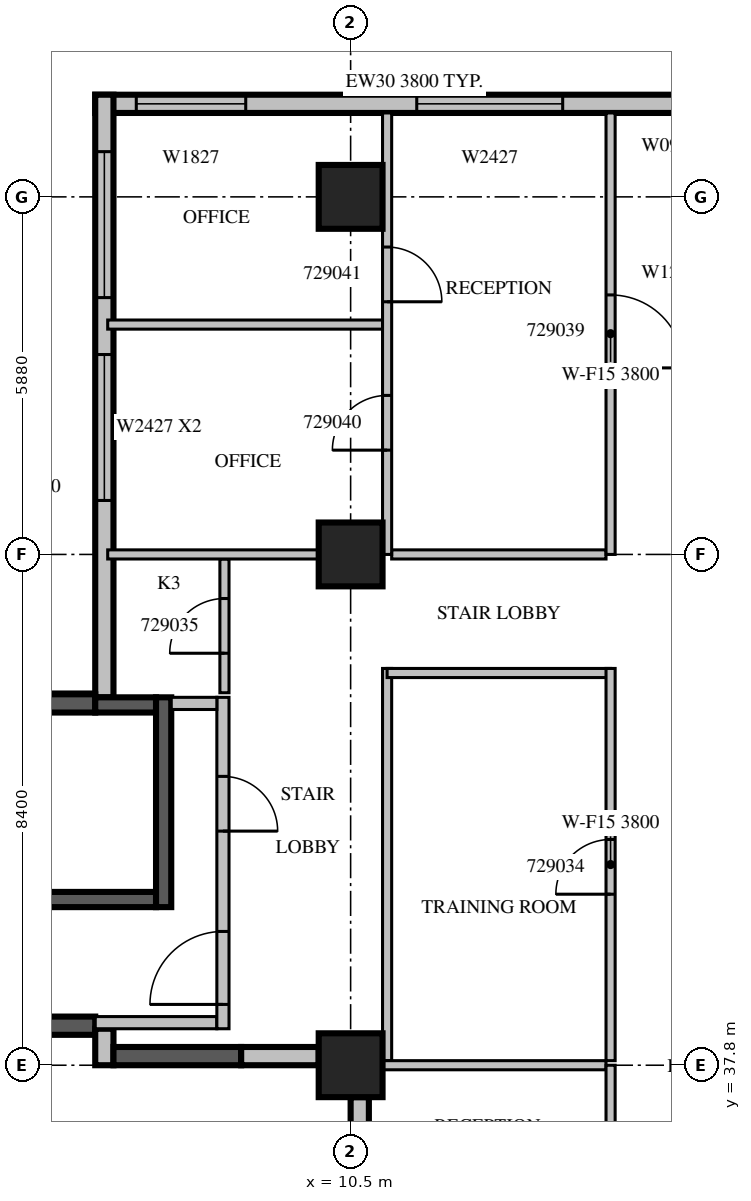
"""IFC4 building model, lengths in metres.
Left out: names, types, materials, properties, quantities, classifications, styles, units other than length and angle.
Written with IfcOpenShell. Run it as: python <this file> out.ifc"""

import sys

from ifc_helpers import new_model, si_unit, direction, frame, frame_2d, origin, origin_2d, place, context, subcontext, project, spatial, rectangle, extrude, source, transform, mapped, element, fill, save


model = new_model("IFC4")
c1 = context("Model", 3, precision=1e-05, world=origin(), true_north=direction((0.0, 1.0)))
c2 = subcontext(c1, "Body", "Model", "MODEL_VIEW")
j1 = project(units=[si_unit("LENGTHUNIT", "METRE"), si_unit("PLANEANGLEUNIT", "RADIAN")], contexts=[c1])
p1 = place(None, origin())
s1 = spatial("IfcSite", under=j1, at=p1, CompositionType="ELEMENT")
p2 = place(p1, origin())
s2 = spatial("IfcBuilding", under=s1, at=p2, CompositionType="ELEMENT")
p3 = place(p2, frame((0.0, 0.0, 132.9)))
s3 = spatial("IfcBuildingStorey", under=s2, at=p3, CompositionType="ELEMENT", Elevation=132.9)
m1 = source(origin(), c2, "Body", "SweptSolid", [
    extrude(rectangle(XDim=1.05, YDim=1.05, at=origin_2d()), origin(), (0.0, 0.0, 1.0), 4.2),
])
for number, where, z_axis, x_axis in (
    (1, (10.5, 37.8, 0.0), (0.0, 0.0, 1.0), (1.0, 0.0, 0.0)),
    (2, (10.5, 46.2, 0.0), (0.0, 0.0, 1.0), (1.0, 0.0, 0.0)),
    (3, (10.5, 52.08, 0.0), (0.0, 0.0, 1.0), (1.0, 0.0, 0.0)),
):
    element("IfcColumn", number, at=place(p3, frame(where, z_axis=z_axis, x_axis=x_axis)), inside=s3, PredefinedType="COLUMN", context=c2, shape_type="MappedRepresentation", body=[
        mapped(m1, transform((0.0, 0.0, 0.0), scale=1.0)),
    ])
m2 = source(origin(), c2, "Body", "SweptSolid", [
    extrude(rectangle(XDim=10.5, YDim=0.3, at=frame_2d((5.25, 0.0))), origin(), (0.0, 0.0, 1.0), 3.8),
])
p4 = place(p3, frame((16.8, 53.61, 0.0), z_axis=(0.0, 0.0, 1.0), x_axis=(-1.0, 0.0, 0.0)))
e4 = element("IfcWall", 4, at=p4, inside=s3, PredefinedType="STANDARD", context=c2, shape_type="MappedRepresentation", body=[
    mapped(m2, transform((0.0, 0.0, 0.0), scale=1.0)),
])
m3 = source(origin(), c2, "Body", "SweptSolid", [
    extrude(rectangle(XDim=1.8, YDim=2.7, at=frame_2d((0.9, 1.35))), frame((0.0, 0.16, 0.0), z_axis=(0.0, -1.0, 0.0), x_axis=(1.0, 0.0, 0.0)), (0.0, 0.0, 1.0), 0.32),
])
p5 = place(p4, frame((8.025, 0.0, 0.6)))
e5 = element("IfcOpeningElement", 5, at=p5, cuts=e4, PredefinedType="OPENING", context=c2, shape_type="MappedRepresentation", body=[
    mapped(m3, transform((0.0, 0.0, 0.0), scale=1.0)),
])
m4 = source(origin(), c2, "Body", "SweptSolid", [
    extrude(rectangle(XDim=2.4, YDim=2.7, at=frame_2d((1.2, 1.35))), frame((0.0, 0.16, 0.0), z_axis=(0.0, -1.0, 0.0), x_axis=(1.0, 0.0, 0.0)), (0.0, 0.0, 1.0), 0.32),
])
p6 = place(p4, frame((2.812, 0.0, 0.6)))
e6 = element("IfcOpeningElement", 6, at=p6, cuts=e4, PredefinedType="OPENING", context=c2, shape_type="MappedRepresentation", body=[
    mapped(m4, transform((0.0, 0.0, 0.0), scale=1.0)),
])
m5 = source(origin(), c2, "Body", "SweptSolid", [
    extrude(rectangle(XDim=9.91, YDim=0.3, at=frame_2d((4.955, 0.0))), origin(), (0.0, 0.0, 1.0), 3.8),
])
p7 = place(p3, frame((6.45, 53.76, 0.0), z_axis=(0.0, 0.0, 1.0), x_axis=(0.0, -1.0, 0.0)))
e7 = element("IfcWall", 7, at=p7, inside=s3, PredefinedType="STANDARD", context=c2, shape_type="MappedRepresentation", body=[
    mapped(m5, transform((0.0, 0.0, 0.0), scale=1.0)),
])
p8 = place(p7, frame((4.272, 0.0, 0.6)))
e8 = element("IfcOpeningElement", 8, at=p8, cuts=e7, PredefinedType="OPENING", context=c2, shape_type="MappedRepresentation", body=[
    mapped(m4, transform((0.0, 0.0, 0.0), scale=1.0)),
])
p9 = place(p7, frame((0.936, 0.0, 0.6)))
e9 = element("IfcOpeningElement", 9, at=p9, cuts=e7, PredefinedType="OPENING", context=c2, shape_type="MappedRepresentation", body=[
    mapped(m4, transform((0.0, 0.0, 0.0), scale=1.0)),
])
m6 = source(origin(), c2, "Body", "SweptSolid", [
    extrude(rectangle(XDim=6.1, YDim=0.3, at=frame_2d((3.05, 0.0))), origin(), (0.0, 0.0, 1.0), 3.8),
])
for number, where, z_axis, x_axis in (
    (10, (6.3, 43.75, 0.0), (0.0, 0.0, 1.0), (-1.0, 0.0, 0.0)),
    (11, (0.2, 38.45, 0.0), (0.0, 0.0, 1.0), (1.0, 0.0, 0.0)),
):
    element("IfcWall", number, at=place(p3, frame(where, z_axis=z_axis, x_axis=x_axis)), inside=s3, PredefinedType="SOLIDWALL", context=c2, shape_type="MappedRepresentation", body=[
        mapped(m6, transform((0.0, 0.0, 0.0), scale=1.0)),
    ])
m7 = source(origin(), c2, "Body", "SweptSolid", [
    extrude(rectangle(XDim=0.6, YDim=0.3, at=frame_2d((0.3, 0.0))), origin(), (0.0, 0.0, 1.0), 3.8),
])
p10 = place(p3, frame((6.45, 38.4, 0.0), z_axis=(0.0, 0.0, 1.0), x_axis=(0.0, -1.0, 0.0)))
e12 = element("IfcWall", 12, at=p10, inside=s3, PredefinedType="STANDARD", context=c2, shape_type="MappedRepresentation", body=[
    mapped(m7, transform((0.0, 0.0, 0.0), scale=1.0)),
])
m8 = source(origin(), c2, "Body", "SweptSolid", [
    extrude(rectangle(XDim=2.1, YDim=0.3, at=frame_2d((1.05, 0.0))), origin(), (0.0, 0.0, 1.0), 3.8),
])
p11 = place(p3, frame((6.6, 37.95, 0.0), z_axis=(0.0, 0.0, 1.0), x_axis=(1.0, 0.0, 0.0)))
e13 = element("IfcWall", 13, at=p11, inside=s3, PredefinedType="SOLIDWALL", context=c2, shape_type="MappedRepresentation", body=[
    mapped(m8, transform((0.0, 0.0, 0.0), scale=1.0)),
])
m9 = source(origin(), c2, "Body", "SweptSolid", [
    extrude(rectangle(XDim=1.275, YDim=0.3, at=frame_2d((0.637, 0.0))), origin(), (0.0, 0.0, 1.0), 3.8),
])
p12 = place(p3, frame((8.7, 37.95, 0.0), z_axis=(0.0, 0.0, 1.0), x_axis=(1.0, 0.0, 0.0)))
e14 = element("IfcWall", 14, at=p12, inside=s3, PredefinedType="STANDARD", context=c2, shape_type="MappedRepresentation", body=[
    mapped(m9, transform((0.0, 0.0, 0.0), scale=1.0)),
])
m10 = source(origin(), c2, "Body", "SweptSolid", [
    extrude(rectangle(XDim=7.35, YDim=0.3, at=frame_2d((3.675, 0.0))), origin(), (0.0, 0.0, 1.0), 2.8),
])
p13 = place(p3, frame((10.65, 37.275, 0.0), z_axis=(0.0, 0.0, 1.0), x_axis=(0.0, -1.0, 0.0)))
e15 = element("IfcWall", 15, at=p13, inside=s3, PredefinedType="STANDARD", context=c2, shape_type="MappedRepresentation", body=[
    mapped(m10, transform((0.0, 0.0, 0.0), scale=1.0)),
])
m11 = source(origin(), c2, "Body", "SweptSolid", [
    extrude(rectangle(XDim=7.0, YDim=0.25, at=frame_2d((3.5, 0.0))), origin(), (0.0, 0.0, 1.0), 3.8),
])
p14 = place(p3, frame((0.3, 40.525, 0.0), z_axis=(0.0, 0.0, 1.0), x_axis=(1.0, 0.0, 0.0)))
e16 = element("IfcWall", 16, at=p14, inside=s3, PredefinedType="SOLIDWALL", context=c2, shape_type="MappedRepresentation", body=[
    mapped(m11, transform((0.0, 0.0, 0.0), scale=1.0)),
])
m12 = source(origin(), c2, "Body", "SweptSolid", [
    extrude(rectangle(XDim=1.1, YDim=2.1, at=frame_2d((0.55, 1.05))), frame((0.0, 0.135, 0.0), z_axis=(0.0, -1.0, 0.0), x_axis=(1.0, 0.0, 0.0)), (0.0, 0.0, 1.0), 0.27),
])
p15 = place(p14, frame((0.55, 0.0, 0.0)))
e17 = element("IfcOpeningElement", 17, at=p15, cuts=e16, PredefinedType="OPENING", context=c2, shape_type="MappedRepresentation", body=[
    mapped(m12, transform((0.0, 0.0, 0.0), scale=1.0)),
])
m13 = source(origin(), c2, "Body", "SweptSolid", [
    extrude(rectangle(XDim=1.0, YDim=0.25, at=frame_2d((0.5, 0.0))), origin(), (0.0, 0.0, 1.0), 3.8),
])
p16 = place(p3, frame((6.3, 43.725, 0.0), z_axis=(0.0, 0.0, 1.0), x_axis=(1.0, 0.0, 0.0)))
e18 = element("IfcWall", 18, at=p16, inside=s3, PredefinedType="SOLIDWALL", context=c2, shape_type="MappedRepresentation", body=[
    mapped(m13, transform((0.0, 0.0, 0.0), scale=1.0)),
])
m14 = source(origin(), c2, "Body", "SweptSolid", [
    extrude(rectangle(XDim=3.45, YDim=0.25, at=frame_2d((1.725, 0.0))), origin(), (0.0, 0.0, 1.0), 3.8),
])
p17 = place(p3, frame((7.425, 40.4, 0.0), z_axis=(0.0, 0.0, 1.0), x_axis=(0.0, 1.0, 0.0)))
e19 = element("IfcWall", 19, at=p17, inside=s3, PredefinedType="SOLIDWALL", context=c2, shape_type="MappedRepresentation", body=[
    mapped(m14, transform((0.0, 0.0, 0.0), scale=1.0)),
])
m15 = source(origin(), c2, "Body", "SweptSolid", [
    extrude(rectangle(XDim=2.0, YDim=0.2, at=frame_2d((1.0, 0.0))), origin(), (0.0, 0.0, 1.0), 3.8),
])
p18 = place(p3, frame((6.3, 38.5, 0.0), z_axis=(0.0, 0.0, 1.0), x_axis=(1.0, 0.0, 0.0)))
e20 = element("IfcWall", 20, at=p18, inside=s3, PredefinedType="PARTITIONING", context=c2, shape_type="MappedRepresentation", body=[
    mapped(m15, transform((0.0, 0.0, 0.0), scale=1.0)),
])
m16 = source(origin(), c2, "Body", "SweptSolid", [
    extrude(rectangle(XDim=5.45, YDim=0.2, at=frame_2d((2.725, 0.0))), origin(), (0.0, 0.0, 1.0), 3.8),
])
p19 = place(p3, frame((8.4, 38.4, 0.0), z_axis=(0.0, 0.0, 1.0), x_axis=(0.0, 1.0, 0.0)))
e21 = element("IfcWall", 21, at=p19, inside=s3, PredefinedType="PARTITIONING", context=c2, shape_type="MappedRepresentation", body=[
    mapped(m16, transform((0.0, 0.0, 0.0), scale=1.0)),
])
m17 = source(origin(), c2, "Body", "SweptSolid", [
    extrude(rectangle(XDim=1.2, YDim=2.1, at=frame_2d((0.6, 1.05))), frame((0.0, 0.11, 0.0), z_axis=(0.0, -1.0, 0.0), x_axis=(1.0, 0.0, 0.0)), (0.0, 0.0, 1.0), 0.22),
])
p20 = place(p19, frame((0.4, 0.0, 0.0)))
e22 = element("IfcOpeningElement", 22, at=p20, cuts=e21, PredefinedType="OPENING", context=c2, shape_type="MappedRepresentation", body=[
    mapped(m17, transform((0.0, 0.0, 0.0), scale=1.0)),
])
m18 = source(origin(), c2, "Body", "SweptSolid", [
    extrude(rectangle(XDim=0.9, YDim=2.1, at=frame_2d((0.45, 1.05))), frame((0.0, 0.11, 0.0), z_axis=(0.0, -1.0, 0.0), x_axis=(1.0, 0.0, 0.0)), (0.0, 0.0, 1.0), 0.22),
])
p21 = place(p19, frame((3.25, 0.0, 0.0)))
e23 = element("IfcOpeningElement", 23, at=p21, cuts=e21, PredefinedType="OPENING", context=c2, shape_type="MappedRepresentation", body=[
    mapped(m18, transform((0.0, 0.0, 0.0), scale=1.0)),
])
m19 = source(origin(), c2, "Body", "SweptSolid", [
    extrude(rectangle(XDim=0.75, YDim=0.2, at=frame_2d((0.375, 0.0))), origin(), (0.0, 0.0, 1.0), 3.8),
])
p22 = place(p3, frame((7.55, 43.75, 0.0), z_axis=(0.0, 0.0, 1.0), x_axis=(1.0, 0.0, 0.0)))
e24 = element("IfcWall", 24, at=p22, inside=s3, PredefinedType="PARTITIONING", context=c2, shape_type="MappedRepresentation", body=[
    mapped(m19, transform((0.0, 0.0, 0.0), scale=1.0)),
])
m20 = source(origin(), c2, "Body", "SweptSolid", [
    extrude(rectangle(XDim=6.45, YDim=0.15, at=frame_2d((3.225, 0.0))), origin(), (0.0, 0.0, 1.0), 3.8),
])
p23 = place(p3, frame((11.1, 44.325, 0.0), z_axis=(0.0, 0.0, 1.0), x_axis=(0.0, -1.0, 0.0)))
e25 = element("IfcWall", 25, at=p23, inside=s3, PredefinedType="PARTITIONING", context=c2, shape_type="MappedRepresentation", body=[
    mapped(m20, transform((0.0, 0.0, 0.0), scale=1.0)),
])
m21 = source(origin(), c2, "Body", "SweptSolid", [
    extrude(rectangle(XDim=3.675, YDim=0.15, at=frame_2d((1.837, 0.0))), origin(), (0.0, 0.0, 1.0), 3.8),
])
p24 = place(p3, frame((14.775, 44.25, 0.0), z_axis=(0.0, 0.0, 1.0), x_axis=(-1.0, 0.0, 0.0)))
e26 = element("IfcWall", 26, at=p24, inside=s3, PredefinedType="PARTITIONING", context=c2, shape_type="MappedRepresentation", body=[
    mapped(m21, transform((0.0, 0.0, 0.0), scale=1.0)),
])
p25 = place(p3, frame((14.775, 37.875, 0.0), z_axis=(0.0, 0.0, 1.0), x_axis=(0.0, 1.0, 0.0)))
e27 = element("IfcWall", 27, at=p25, inside=s3, PredefinedType="PARTITIONING", context=c2, shape_type="MappedRepresentation", body=[
    mapped(m20, transform((0.0, 0.0, 0.0), scale=1.0)),
])
m22 = source(origin(), c2, "Body", "SweptSolid", [
    extrude(rectangle(XDim=0.9, YDim=2.1, at=frame_2d((0.45, 1.05))), frame((0.0, 0.085, 0.0), z_axis=(0.0, -1.0, 0.0), x_axis=(1.0, 0.0, 0.0)), (0.0, 0.0, 1.0), 0.17),
])
p26 = place(p25, frame((2.737, 0.0, 0.0)))
e28 = element("IfcOpeningElement", 28, at=p26, cuts=e27, PredefinedType="OPENING", context=c2, shape_type="MappedRepresentation", body=[
    mapped(m22, transform((0.0, 0.0, 0.0), scale=1.0)),
])
m23 = source(origin(), c2, "Body", "SweptSolid", [
    extrude(rectangle(XDim=2.2, YDim=0.15, at=frame_2d((1.1, 0.0))), origin(), (0.0, 0.0, 1.0), 3.8),
])
p27 = place(p3, frame((8.425, 43.925, 0.0), z_axis=(0.0, 0.0, 1.0), x_axis=(0.0, 1.0, 0.0)))
e29 = element("IfcWall", 29, at=p27, inside=s3, PredefinedType="PARTITIONING", context=c2, shape_type="MappedRepresentation", body=[
    mapped(m23, transform((0.0, 0.0, 0.0), scale=1.0)),
])
p28 = place(p27, frame((0.65, 0.0, 0.0)))
e30 = element("IfcOpeningElement", 30, at=p28, cuts=e29, PredefinedType="OPENING", context=c2, shape_type="MappedRepresentation", body=[
    mapped(m22, transform((0.0, 0.0, 0.0), scale=1.0)),
])
m24 = source(origin(), c2, "Body", "SweptSolid", [
    extrude(rectangle(XDim=3.676, YDim=0.15, at=frame_2d((1.838, 0.0))), origin(), (0.0, 0.0, 1.0), 3.8),
])
p29 = place(p3, frame((14.7, 37.8, 0.0), z_axis=(0.0, 0.0, 1.0), x_axis=(-1.0, 0.0, 0.0)))
e31 = element("IfcWall", 31, at=p29, inside=s3, PredefinedType="PARTITIONING", context=c2, shape_type="MappedRepresentation", body=[
    mapped(m24, transform((0.0, 0.0, 0.0), scale=1.0)),
])
m25 = source(origin(), c2, "Body", "SweptSolid", [
    extrude(rectangle(XDim=4.52, YDim=0.15, at=frame_2d((2.26, 0.0))), origin(), (0.0, 0.0, 1.0), 3.8),
])
p30 = place(p3, frame((11.025, 49.98, 0.0), z_axis=(0.0, 0.0, 1.0), x_axis=(-1.0, 0.0, 0.0)))
e32 = element("IfcWall", 32, at=p30, inside=s3, PredefinedType="PARTITIONING", context=c2, shape_type="MappedRepresentation", body=[
    mapped(m25, transform((0.0, 0.0, 0.0), scale=1.0)),
])
m26 = source(origin(), c2, "Body", "SweptSolid", [
    extrude(rectangle(XDim=3.471, YDim=0.15, at=frame_2d((1.736, 0.0))), origin(), (0.0, 0.0, 1.0), 3.8),
])
p31 = place(p3, frame((9.976, 46.2, 0.0), z_axis=(0.0, 0.0, 1.0), x_axis=(-1.0, 0.0, 0.0)))
e33 = element("IfcWall", 33, at=p31, inside=s3, PredefinedType="PARTITIONING", context=c2, shape_type="MappedRepresentation", body=[
    mapped(m26, transform((0.0, 0.0, 0.0), scale=1.0)),
])
m27 = source(origin(), c2, "Body", "SweptSolid", [
    extrude(rectangle(XDim=3.525, YDim=0.15, at=frame_2d((1.762, 0.0))), origin(), (0.0, 0.0, 1.0), 3.8),
])
p32 = place(p3, frame((14.7, 46.2, 0.0), z_axis=(0.0, 0.0, 1.0), x_axis=(-1.0, 0.0, 0.0)))
e34 = element("IfcWall", 34, at=p32, inside=s3, PredefinedType="PARTITIONING", context=c2, shape_type="MappedRepresentation", body=[
    mapped(m27, transform((0.0, 0.0, 0.0), scale=1.0)),
])
m28 = source(origin(), c2, "Body", "SweptSolid", [
    extrude(rectangle(XDim=7.26, YDim=0.15, at=frame_2d((3.63, 0.0))), origin(), (0.0, 0.0, 1.0), 3.8),
])
p33 = place(p3, frame((11.1, 46.2, 0.0), z_axis=(0.0, 0.0, 1.0), x_axis=(0.0, 1.0, 0.0)))
e35 = element("IfcWall", 35, at=p33, inside=s3, PredefinedType="PARTITIONING", context=c2, shape_type="MappedRepresentation", body=[
    mapped(m28, transform((0.0, 0.0, 0.0), scale=1.0)),
])
p34 = place(p33, frame((1.715, 0.0, 0.0)))
e36 = element("IfcOpeningElement", 36, at=p34, cuts=e35, PredefinedType="OPENING", context=c2, shape_type="MappedRepresentation", body=[
    mapped(m22, transform((0.0, 0.0, 0.0), scale=1.0)),
])
p35 = place(p33, frame((4.155, 0.0, 0.0)))
e37 = element("IfcOpeningElement", 37, at=p35, cuts=e35, PredefinedType="OPENING", context=c2, shape_type="MappedRepresentation", body=[
    mapped(m22, transform((0.0, 0.0, 0.0), scale=1.0)),
])
m29 = source(origin(), c2, "Body", "SweptSolid", [
    extrude(rectangle(XDim=8.4, YDim=0.15, at=frame_2d((4.2, 0.0))), origin(), (0.0, 0.0, 1.0), 3.3),
])
p36 = place(p3, frame((14.775, 29.4, 0.0), z_axis=(0.0, 0.0, 1.0), x_axis=(0.0, 1.0, 0.0)))
e38 = element("IfcWall", 38, at=p36, inside=s3, PredefinedType="PARTITIONING", context=c2, shape_type="MappedRepresentation", body=[
    mapped(m29, transform((0.0, 0.0, 0.0), scale=1.0)),
])
m30 = source(origin(), c2, "Body", "SweptSolid", [
    extrude(rectangle(XDim=1.1, YDim=2.1, at=frame_2d((0.55, 1.05))), frame((0.0, 0.085, 0.0), z_axis=(0.0, -1.0, 0.0), x_axis=(1.0, 0.0, 0.0)), (0.0, 0.0, 1.0), 0.17),
])
p37 = place(p36, frame((6.146, 0.0, 0.0)))
e39 = element("IfcOpeningElement", 39, at=p37, cuts=e38, PredefinedType="OPENING", context=c2, shape_type="MappedRepresentation", body=[
    mapped(m30, transform((0.0, 0.0, 0.0), scale=1.0)),
])
p38 = place(p36, frame((0.781, 0.0, 0.0)))
e40 = element("IfcOpeningElement", 40, at=p38, cuts=e38, PredefinedType="OPENING", context=c2, shape_type="MappedRepresentation", body=[
    mapped(m22, transform((0.0, 0.0, 0.0), scale=1.0)),
])
p39 = place(p36, frame((3.276, 0.0, 0.0)))
e41 = element("IfcOpeningElement", 41, at=p39, cuts=e38, PredefinedType="OPENING", context=c2, shape_type="MappedRepresentation", body=[
    mapped(m22, transform((0.0, 0.0, 0.0), scale=1.0)),
])
p40 = place(p3, frame((14.775, 46.2, 0.0), z_axis=(0.0, 0.0, 1.0), x_axis=(0.0, 1.0, 0.0)))
e42 = element("IfcWall", 42, at=p40, inside=s3, PredefinedType="PARTITIONING", context=c2, shape_type="MappedRepresentation", body=[
    mapped(m28, transform((0.0, 0.0, 0.0), scale=1.0)),
])
m31 = source(origin(), c2, "Body", "SweptSolid", [
    extrude(rectangle(XDim=1.2, YDim=2.1, at=frame_2d((0.6, 1.05))), frame((0.0, 0.085, 0.0), z_axis=(0.0, -1.0, 0.0), x_axis=(1.0, 0.0, 0.0)), (0.0, 0.0, 1.0), 0.17),
])
p41 = place(p40, frame((3.067, 0.0, 0.0)))
e43 = element("IfcOpeningElement", 43, at=p41, cuts=e42, PredefinedType="OPENING", context=c2, shape_type="MappedRepresentation", body=[
    mapped(m31, transform((0.0, 0.0, 0.0), scale=1.0)),
])
m32 = source(origin(), c2, "Body", "SweptSolid", [
    extrude(rectangle(XDim=1.8, YDim=2.7, at=frame_2d((0.9, 1.35))), frame((0.0, 0.03, 0.0), z_axis=(0.0, -1.0, 0.0), x_axis=(1.0, 0.0, 0.0)), (0.0, 0.0, 1.0), 0.06),
])
p42 = place(p5, origin())
e44 = element("IfcWindow", 44, at=p42, inside=s3, PartitioningType="SINGLE_PANEL", PredefinedType="WINDOW", context=c2, shape_type="MappedRepresentation", body=[
    mapped(m32, transform((0.0, 0.0, 0.0), scale=1.0)),
])
fill(e5, e44)
m33 = source(origin(), c2, "Body", "SweptSolid", [
    extrude(rectangle(XDim=2.4, YDim=2.7, at=frame_2d((1.2, 1.35))), frame((0.0, 0.03, 0.0), z_axis=(0.0, -1.0, 0.0), x_axis=(1.0, 0.0, 0.0)), (0.0, 0.0, 1.0), 0.06),
])
p43 = place(p6, origin())
e45 = element("IfcWindow", 45, at=p43, inside=s3, PartitioningType="SINGLE_PANEL", PredefinedType="WINDOW", context=c2, shape_type="MappedRepresentation", body=[
    mapped(m33, transform((0.0, 0.0, 0.0), scale=1.0)),
])
fill(e6, e45)
p44 = place(p8, origin())
e46 = element("IfcWindow", 46, at=p44, inside=s3, PartitioningType="SINGLE_PANEL", PredefinedType="WINDOW", context=c2, shape_type="MappedRepresentation", body=[
    mapped(m33, transform((0.0, 0.0, 0.0), scale=1.0)),
])
fill(e8, e46)
p45 = place(p9, origin())
e47 = element("IfcWindow", 47, at=p45, inside=s3, PartitioningType="SINGLE_PANEL", PredefinedType="WINDOW", context=c2, shape_type="MappedRepresentation", body=[
    mapped(m33, transform((0.0, 0.0, 0.0), scale=1.0)),
])
fill(e9, e47)
m34 = source(origin(), c2, "Body", "SweptSolid", [
    extrude(rectangle(XDim=1.2, YDim=2.1, at=frame_2d((0.6, 1.05))), frame((0.0, 0.025, 0.0), z_axis=(0.0, -1.0, 0.0), x_axis=(1.0, 0.0, 0.0)), (0.0, 0.0, 1.0), 0.05),
])
p46 = place(p20, origin())
e48 = element("IfcDoor", 48, at=p46, inside=s3, OperationType="SINGLE_SWING_LEFT", PredefinedType="DOOR", context=c2, shape_type="MappedRepresentation", body=[
    mapped(m34, transform((0.0, 0.0, 0.0), scale=1.0)),
])
fill(e22, e48)
m35 = source(origin(), c2, "Body", "SweptSolid", [
    extrude(rectangle(XDim=0.9, YDim=2.1, at=frame_2d((0.45, 1.05))), frame((0.0, 0.025, 0.0), z_axis=(0.0, -1.0, 0.0), x_axis=(1.0, 0.0, 0.0)), (0.0, 0.0, 1.0), 0.05),
])
p47 = place(p21, origin())
e49 = element("IfcDoor", 49, at=p47, inside=s3, OperationType="SINGLE_SWING_RIGHT", PredefinedType="DOOR", context=c2, shape_type="MappedRepresentation", body=[
    mapped(m35, transform((0.0, 0.0, 0.0), scale=1.0)),
])
fill(e23, e49)
p48 = place(p26, origin())
e50 = element("IfcDoor", 50, at=p48, inside=s3, OperationType="SINGLE_SWING_LEFT", PredefinedType="DOOR", context=c2, shape_type="MappedRepresentation", body=[
    mapped(m35, transform((0.0, 0.0, 0.0), scale=1.0)),
])
fill(e28, e50)
p49 = place(p28, origin())
e51 = element("IfcDoor", 51, at=p49, inside=s3, OperationType="SINGLE_SWING_LEFT", PredefinedType="DOOR", context=c2, shape_type="MappedRepresentation", body=[
    mapped(m35, transform((0.0, 0.0, 0.0), scale=1.0)),
])
fill(e30, e51)
p50 = place(p41, origin())
e52 = element("IfcDoor", 52, at=p50, inside=s3, OperationType="SINGLE_SWING_RIGHT", PredefinedType="DOOR", context=c2, shape_type="MappedRepresentation", body=[
    mapped(m34, transform((0.0, 0.0, 0.0), scale=1.0)),
])
fill(e43, e52)
p51 = place(p34, origin())
e53 = element("IfcDoor", 53, at=p51, inside=s3, OperationType="SINGLE_SWING_LEFT", PredefinedType="DOOR", context=c2, shape_type="MappedRepresentation", body=[
    mapped(m35, transform((0.0, 0.0, 0.0), scale=1.0)),
])
fill(e36, e53)
p52 = place(p35, origin())
e54 = element("IfcDoor", 54, at=p52, inside=s3, OperationType="SINGLE_SWING_RIGHT", PredefinedType="DOOR", context=c2, shape_type="MappedRepresentation", body=[
    mapped(m35, transform((0.0, 0.0, 0.0), scale=1.0)),
])
fill(e37, e54)
save(model, sys.argv[1])
